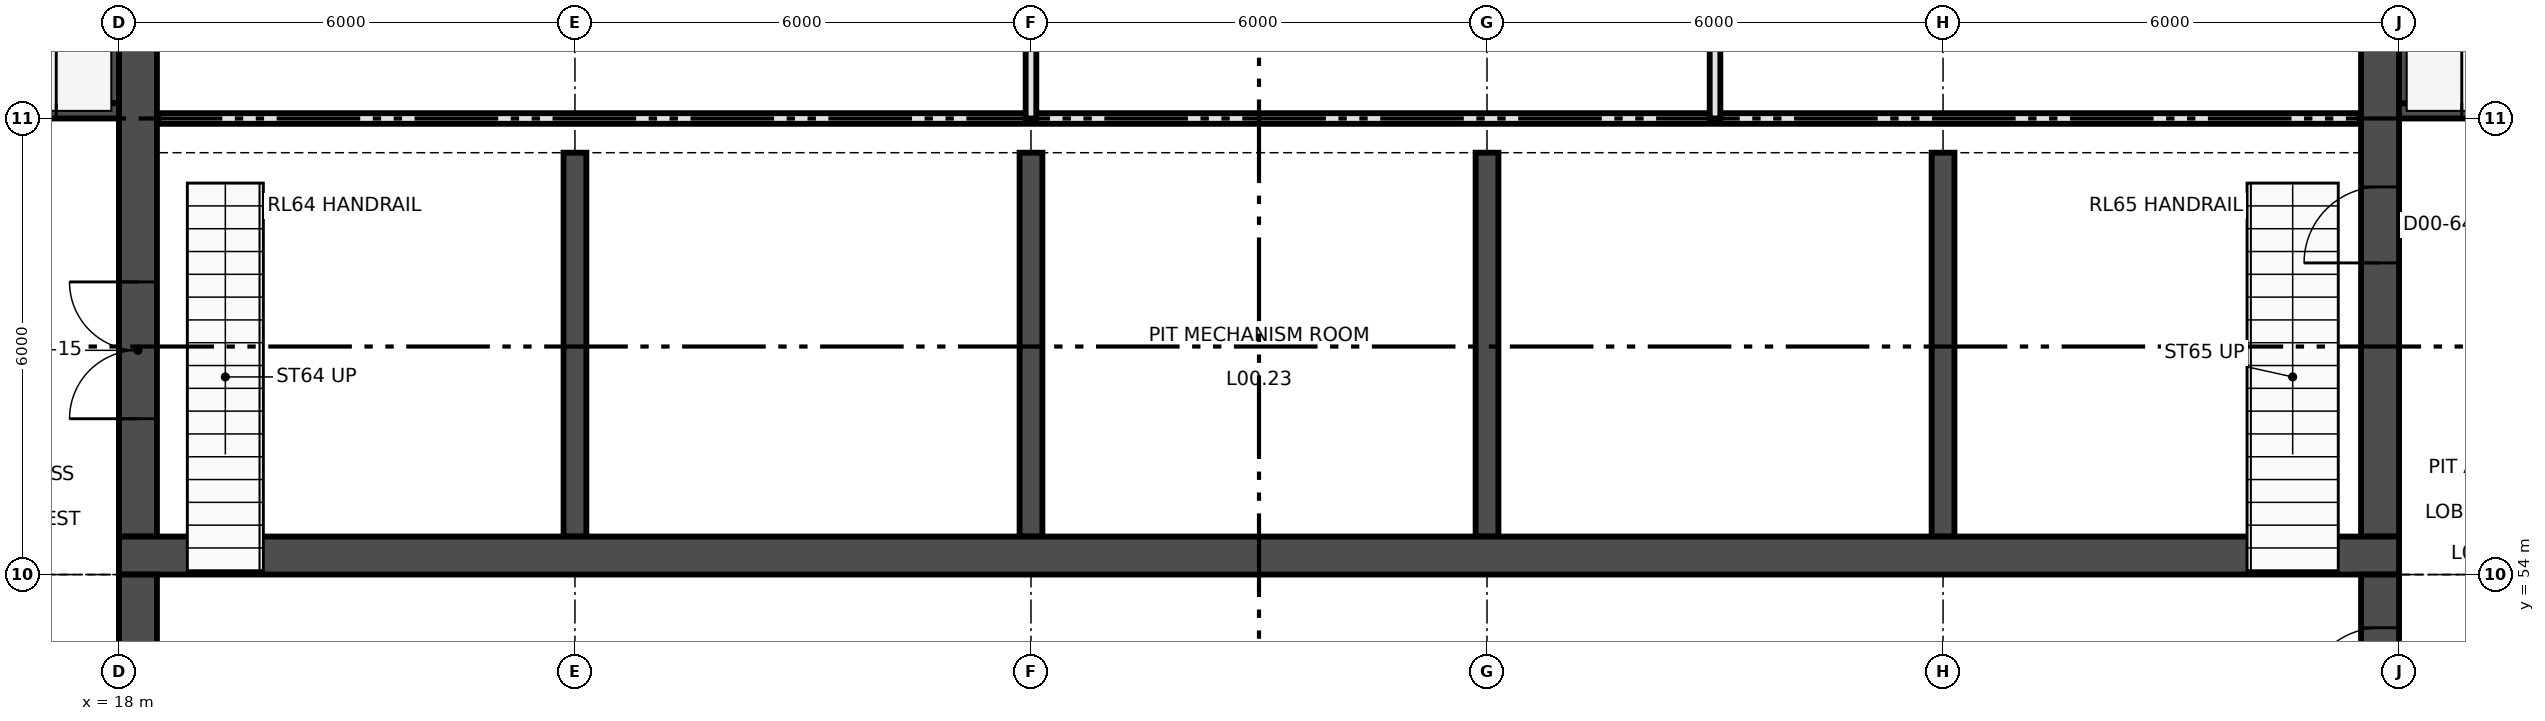
"""IFC4 building model, lengths in metres.
Left out: names, types, materials, properties, quantities, classifications, styles, units other than length and angle.
Written with IfcOpenShell. Run it as: python <this file> out.ifc"""

import sys

from ifc_helpers import new_model, si_unit, direction, frame, frame_2d, origin, place, context, subcontext, project, spatial, rectangle, extrude, element, fill, save


model = new_model("IFC4")
c1 = context("Model", 3, precision=1e-05, world=origin(), true_north=direction((0.0, 1.0)))
c2 = subcontext(c1, "Body", "Model", "MODEL_VIEW")
j1 = project(units=[si_unit("LENGTHUNIT", "METRE"), si_unit("PLANEANGLEUNIT", "RADIAN")], contexts=[c1])
p1 = place(None, origin())
s1 = spatial("IfcSite", under=j1, at=p1, CompositionType="ELEMENT")
p2 = place(p1, origin())
s2 = spatial("IfcBuilding", under=s1, at=p2, CompositionType="ELEMENT")
p3 = place(p2, origin())
s3 = spatial("IfcBuildingStorey", under=s2, at=p3, CompositionType="ELEMENT", Elevation=0.0)
p4 = place(p3, frame((12.0, 60.1, -0.3), z_axis=(0.0, 0.0, 1.0), x_axis=(1.0, 0.0, 0.0)))
e1 = element("IfcWall", 1, at=p4, inside=s3, PredefinedType="SHEAR", context=c2, shape_type="SweptSolid", body=[
    extrude(rectangle(XDim=6.0, YDim=0.2, at=frame_2d((3.0, 0.0))), origin(), (0.0, 0.0, 1.0), 7.3),
])
p5 = place(p4, frame((3.375, 0.0, 0.3)))
e2 = element("IfcOpeningElement", 2, at=p5, cuts=e1, PredefinedType="OPENING", context=c2, shape_type="SweptSolid", body=[
    extrude(rectangle(XDim=1.8, YDim=2.2, at=frame_2d((0.9, 1.1))), frame((0.0, 0.11, 0.0), z_axis=(0.0, -1.0, 0.0), x_axis=(1.0, 0.0, 0.0)), (0.0, 0.0, 1.0), 0.22),
])
p6 = place(p3, frame((17.9, 60.2, -0.3), z_axis=(0.0, 0.0, 1.0), x_axis=(0.0, 1.0, 0.0)))
e3 = element("IfcWall", 3, at=p6, inside=s3, PredefinedType="SHEAR", context=c2, shape_type="SweptSolid", body=[
    extrude(rectangle(XDim=5.6, YDim=0.2, at=frame_2d((2.8, 0.0))), origin(), (0.0, 0.0, 1.0), 7.3),
])
p7 = place(p3, frame((48.0, 60.1, -0.3), z_axis=(0.0, 0.0, 1.0), x_axis=(1.0, 0.0, 0.0)))
e4 = element("IfcWall", 4, at=p7, inside=s3, PredefinedType="SHEAR", context=c2, shape_type="SweptSolid", body=[
    extrude(rectangle(XDim=6.0, YDim=0.2, at=frame_2d((3.0, 0.0))), origin(), (0.0, 0.0, 1.0), 7.3),
])
p8 = place(p7, frame((0.825, 0.0, 0.3)))
e5 = element("IfcOpeningElement", 5, at=p8, cuts=e4, PredefinedType="OPENING", context=c2, shape_type="SweptSolid", body=[
    extrude(rectangle(XDim=1.8, YDim=2.2, at=frame_2d((0.9, 1.1))), frame((0.0, 0.11, 0.0), z_axis=(0.0, -1.0, 0.0), x_axis=(1.0, 0.0, 0.0)), (0.0, 0.0, 1.0), 0.22),
])
p9 = place(p3, frame((48.1, 60.2, -0.3), z_axis=(0.0, 0.0, 1.0), x_axis=(0.0, 1.0, 0.0)))
e6 = element("IfcWall", 6, at=p9, inside=s3, PredefinedType="SHEAR", context=c2, shape_type="SweptSolid", body=[
    extrude(rectangle(XDim=5.6, YDim=0.2, at=frame_2d((2.8, 0.0))), origin(), (0.0, 0.0, 1.0), 7.3),
])
p10 = place(p3, frame((18.25, 54.5, -0.3), z_axis=(0.0, 0.0, 1.0), x_axis=(0.0, 1.0, 0.0)))
e7 = element("IfcWall", 7, at=p10, inside=s3, PredefinedType="SHEAR", context=c2, shape_type="SweptSolid", body=[
    extrude(rectangle(XDim=35.5, YDim=0.5, at=frame_2d((17.75, 0.0))), origin(), (0.0, 0.0, 1.0), 7.3),
])
p11 = place(p10, frame((1.55, 0.0, 0.3)))
e8 = element("IfcOpeningElement", 8, at=p11, cuts=e7, PredefinedType="OPENING", context=c2, shape_type="SweptSolid", body=[
    extrude(rectangle(XDim=1.8, YDim=2.1, at=frame_2d((0.9, 1.05))), frame((0.0, 0.26, 0.0), z_axis=(0.0, -1.0, 0.0), x_axis=(1.0, 0.0, 0.0)), (0.0, 0.0, 1.0), 0.52),
])
p12 = place(p10, frame((18.05, 0.0, 0.3)))
e9 = element("IfcOpeningElement", 9, at=p12, cuts=e7, PredefinedType="OPENING", context=c2, shape_type="SweptSolid", body=[
    extrude(rectangle(XDim=1.8, YDim=2.1, at=frame_2d((0.9, 1.05))), frame((0.0, 0.26, 0.0), z_axis=(0.0, -1.0, 0.0), x_axis=(1.0, 0.0, 0.0)), (0.0, 0.0, 1.0), 0.52),
])
p13 = place(p3, frame((18.25, 30.0, -0.3), z_axis=(0.0, 0.0, 1.0), x_axis=(0.0, 1.0, 0.0)))
e10 = element("IfcWall", 10, at=p13, inside=s3, PredefinedType="SHEAR", context=c2, shape_type="SweptSolid", body=[
    extrude(rectangle(XDim=24.0, YDim=0.5, at=frame_2d((12.0, 0.0))), origin(), (0.0, 0.0, 1.0), 7.3),
])
p14 = place(p13, frame((16.95, 0.0, 0.3)))
e11 = element("IfcOpeningElement", 11, at=p14, cuts=e10, PredefinedType="OPENING", context=c2, shape_type="SweptSolid", body=[
    extrude(rectangle(XDim=2.1, YDim=2.4, at=frame_2d((1.05, 1.2))), frame((0.0, 0.26, 0.0), z_axis=(0.0, -1.0, 0.0), x_axis=(1.0, 0.0, 0.0)), (0.0, 0.0, 1.0), 0.52),
])
p15 = place(p13, frame((2.25, 0.0, 0.3)))
e12 = element("IfcOpeningElement", 12, at=p15, cuts=e10, PredefinedType="OPENING", context=c2, shape_type="SweptSolid", body=[
    extrude(rectangle(XDim=1.5, YDim=2.1, at=frame_2d((0.75, 1.05))), frame((0.0, 0.26, 0.0), z_axis=(0.0, -1.0, 0.0), x_axis=(1.0, 0.0, 0.0)), (0.0, 0.0, 1.0), 0.52),
])
p16 = place(p3, frame((47.75, 54.5, -0.3), z_axis=(0.0, 0.0, 1.0), x_axis=(0.0, 1.0, 0.0)))
e13 = element("IfcWall", 13, at=p16, inside=s3, PredefinedType="SHEAR", context=c2, shape_type="SweptSolid", body=[
    extrude(rectangle(XDim=35.5, YDim=0.5, at=frame_2d((17.75, 0.0))), origin(), (0.0, 0.0, 1.0), 7.3),
])
p17 = place(p16, frame((18.05, 0.0, 0.3)))
e14 = element("IfcOpeningElement", 14, at=p17, cuts=e13, PredefinedType="OPENING", context=c2, shape_type="SweptSolid", body=[
    extrude(rectangle(XDim=1.8, YDim=2.1, at=frame_2d((0.9, 1.05))), frame((0.0, 0.26, 0.0), z_axis=(0.0, -1.0, 0.0), x_axis=(1.0, 0.0, 0.0)), (0.0, 0.0, 1.0), 0.52),
])
p18 = place(p16, frame((3.6, 0.0, 0.3)))
e15 = element("IfcOpeningElement", 15, at=p18, cuts=e13, PredefinedType="OPENING", context=c2, shape_type="SweptSolid", body=[
    extrude(rectangle(XDim=1.0, YDim=2.1, at=frame_2d((0.5, 1.05))), frame((0.0, 0.26, 0.0), z_axis=(0.0, -1.0, 0.0), x_axis=(1.0, 0.0, 0.0)), (0.0, 0.0, 1.0), 0.52),
])
p19 = place(p3, frame((47.75, 30.0, -0.3), z_axis=(0.0, 0.0, 1.0), x_axis=(0.0, 1.0, 0.0)))
e16 = element("IfcWall", 16, at=p19, inside=s3, PredefinedType="SHEAR", context=c2, shape_type="SweptSolid", body=[
    extrude(rectangle(XDim=24.0, YDim=0.5, at=frame_2d((12.0, 0.0))), origin(), (0.0, 0.0, 1.0), 7.3),
])
p20 = place(p19, frame((2.25, 0.0, 0.3)))
e17 = element("IfcOpeningElement", 17, at=p20, cuts=e16, PredefinedType="OPENING", context=c2, shape_type="SweptSolid", body=[
    extrude(rectangle(XDim=1.5, YDim=2.1, at=frame_2d((0.75, 1.05))), frame((0.0, 0.26, 0.0), z_axis=(0.0, -1.0, 0.0), x_axis=(1.0, 0.0, 0.0)), (0.0, 0.0, 1.0), 0.52),
])
p21 = place(p19, frame((22.3, 0.0, 0.3)))
e18 = element("IfcOpeningElement", 18, at=p21, cuts=e16, PredefinedType="OPENING", context=c2, shape_type="SweptSolid", body=[
    extrude(rectangle(XDim=1.0, YDim=2.1, at=frame_2d((0.5, 1.05))), frame((0.0, 0.26, 0.0), z_axis=(0.0, -1.0, 0.0), x_axis=(1.0, 0.0, 0.0)), (0.0, 0.0, 1.0), 0.52),
])
p22 = place(p3, frame((18.0, 54.25, -0.3), z_axis=(0.0, 0.0, 1.0), x_axis=(1.0, 0.0, 0.0)))
e19 = element("IfcWall", 19, at=p22, inside=s3, PredefinedType="SHEAR", context=c2, shape_type="SweptSolid", body=[
    extrude(rectangle(XDim=30.0, YDim=0.5, at=frame_2d((15.0, 0.0))), origin(), (0.0, 0.0, 1.0), 7.3),
])
for number, where, z_axis, x_axis in (
    (20, (24.0, 54.5, -0.3), (0.0, 0.0, 1.0), (0.0, 1.0, 0.0)),
    (21, (30.0, 54.5, -0.3), (0.0, 0.0, 1.0), (0.0, 1.0, 0.0)),
    (22, (36.0, 54.5, -0.3), (0.0, 0.0, 1.0), (0.0, 1.0, 0.0)),
    (23, (42.0, 54.5, -0.3), (0.0, 0.0, 1.0), (0.0, 1.0, 0.0)),
):
    element("IfcWall", number, at=place(p3, frame(where, z_axis=z_axis, x_axis=x_axis)), inside=s3, PredefinedType="SHEAR", context=c2, shape_type="SweptSolid", body=[
        extrude(rectangle(XDim=5.05, YDim=0.3, at=frame_2d((2.525, 0.0))), origin(), (0.0, 0.0, 1.0), 4.0),
    ])
p23 = place(p3, frame((18.52, 60.0, 0.0), z_axis=(0.0, 0.0, 1.0), x_axis=(1.0, 0.0, 0.0)))
e24 = element("IfcWall", 24, at=p23, inside=s3, PredefinedType="PARTITIONING", context=c2, shape_type="SweptSolid", body=[
    extrude(rectangle(XDim=28.96, YDim=0.14, at=frame_2d((14.48, 0.0))), origin(), (0.0, 0.0, 1.0), 2.964),
])
for number, where, z_axis, x_axis in (
    (25, (30.0, 60.0, 0.0), (0.0, 0.0, 1.0), (0.0, 1.0, 0.0)),
    (26, (39.0, 60.0, 0.0), (0.0, 0.0, 1.0), (0.0, 1.0, 0.0)),
):
    element("IfcWall", number, at=place(p3, frame(where, z_axis=z_axis, x_axis=x_axis)), inside=s3, PredefinedType="PARTITIONING", context=c2, shape_type="SweptSolid", body=[
        extrude(rectangle(XDim=12.0, YDim=0.14, at=frame_2d((6.0, 0.0))), origin(), (0.0, 0.0, 1.0), 2.964),
    ])
p24 = place(p11, frame((1.8, 0.0, 0.0), z_axis=(0.0, 0.0, 1.0), x_axis=(-1.0, 0.0, 0.0)))
e27 = element("IfcDoor", 27, at=p24, inside=s3, OperationType="DOUBLE_DOOR_SINGLE_SWING", PredefinedType="DOOR", context=c2, shape_type="SweptSolid", body=[
    extrude(rectangle(XDim=1.8, YDim=2.1, at=frame_2d((0.9, 1.05))), frame((0.0, 0.025, 0.0), z_axis=(0.0, -1.0, 0.0), x_axis=(1.0, 0.0, 0.0)), (0.0, 0.0, 1.0), 0.05),
])
fill(e8, e27)
p25 = place(p5, origin())
e28 = element("IfcDoor", 28, at=p25, inside=s3, OperationType="DOUBLE_DOOR_SINGLE_SWING", PredefinedType="DOOR", context=c2, shape_type="SweptSolid", body=[
    extrude(rectangle(XDim=1.8, YDim=2.2, at=frame_2d((0.9, 1.1))), frame((0.0, 0.025, 0.0), z_axis=(0.0, -1.0, 0.0), x_axis=(1.0, 0.0, 0.0)), (0.0, 0.0, 1.0), 0.05),
])
fill(e2, e28)
p26 = place(p8, origin())
e29 = element("IfcDoor", 29, at=p26, inside=s3, OperationType="DOUBLE_DOOR_SINGLE_SWING", PredefinedType="DOOR", context=c2, shape_type="SweptSolid", body=[
    extrude(rectangle(XDim=1.8, YDim=2.2, at=frame_2d((0.9, 1.1))), frame((0.0, 0.025, 0.0), z_axis=(0.0, -1.0, 0.0), x_axis=(1.0, 0.0, 0.0)), (0.0, 0.0, 1.0), 0.05),
])
fill(e5, e29)
p27 = place(p18, frame((1.0, 0.0, 0.0), z_axis=(0.0, 0.0, 1.0), x_axis=(-1.0, 0.0, 0.0)))
e30 = element("IfcDoor", 30, at=p27, inside=s3, OperationType="SINGLE_SWING_LEFT", PredefinedType="DOOR", context=c2, shape_type="SweptSolid", body=[
    extrude(rectangle(XDim=1.0, YDim=2.1, at=frame_2d((0.5, 1.05))), frame((0.0, 0.025, 0.0), z_axis=(0.0, -1.0, 0.0), x_axis=(1.0, 0.0, 0.0)), (0.0, 0.0, 1.0), 0.05),
])
fill(e15, e30)
p28 = place(p21, frame((1.0, 0.0, 0.0), z_axis=(0.0, 0.0, 1.0), x_axis=(-1.0, 0.0, 0.0)))
e31 = element("IfcDoor", 31, at=p28, inside=s3, OperationType="SINGLE_SWING_LEFT", PredefinedType="DOOR", context=c2, shape_type="SweptSolid", body=[
    extrude(rectangle(XDim=1.0, YDim=2.1, at=frame_2d((0.5, 1.05))), frame((0.0, 0.025, 0.0), z_axis=(0.0, -1.0, 0.0), x_axis=(1.0, 0.0, 0.0)), (0.0, 0.0, 1.0), 0.05),
])
fill(e18, e31)
save(model, sys.argv[1])
